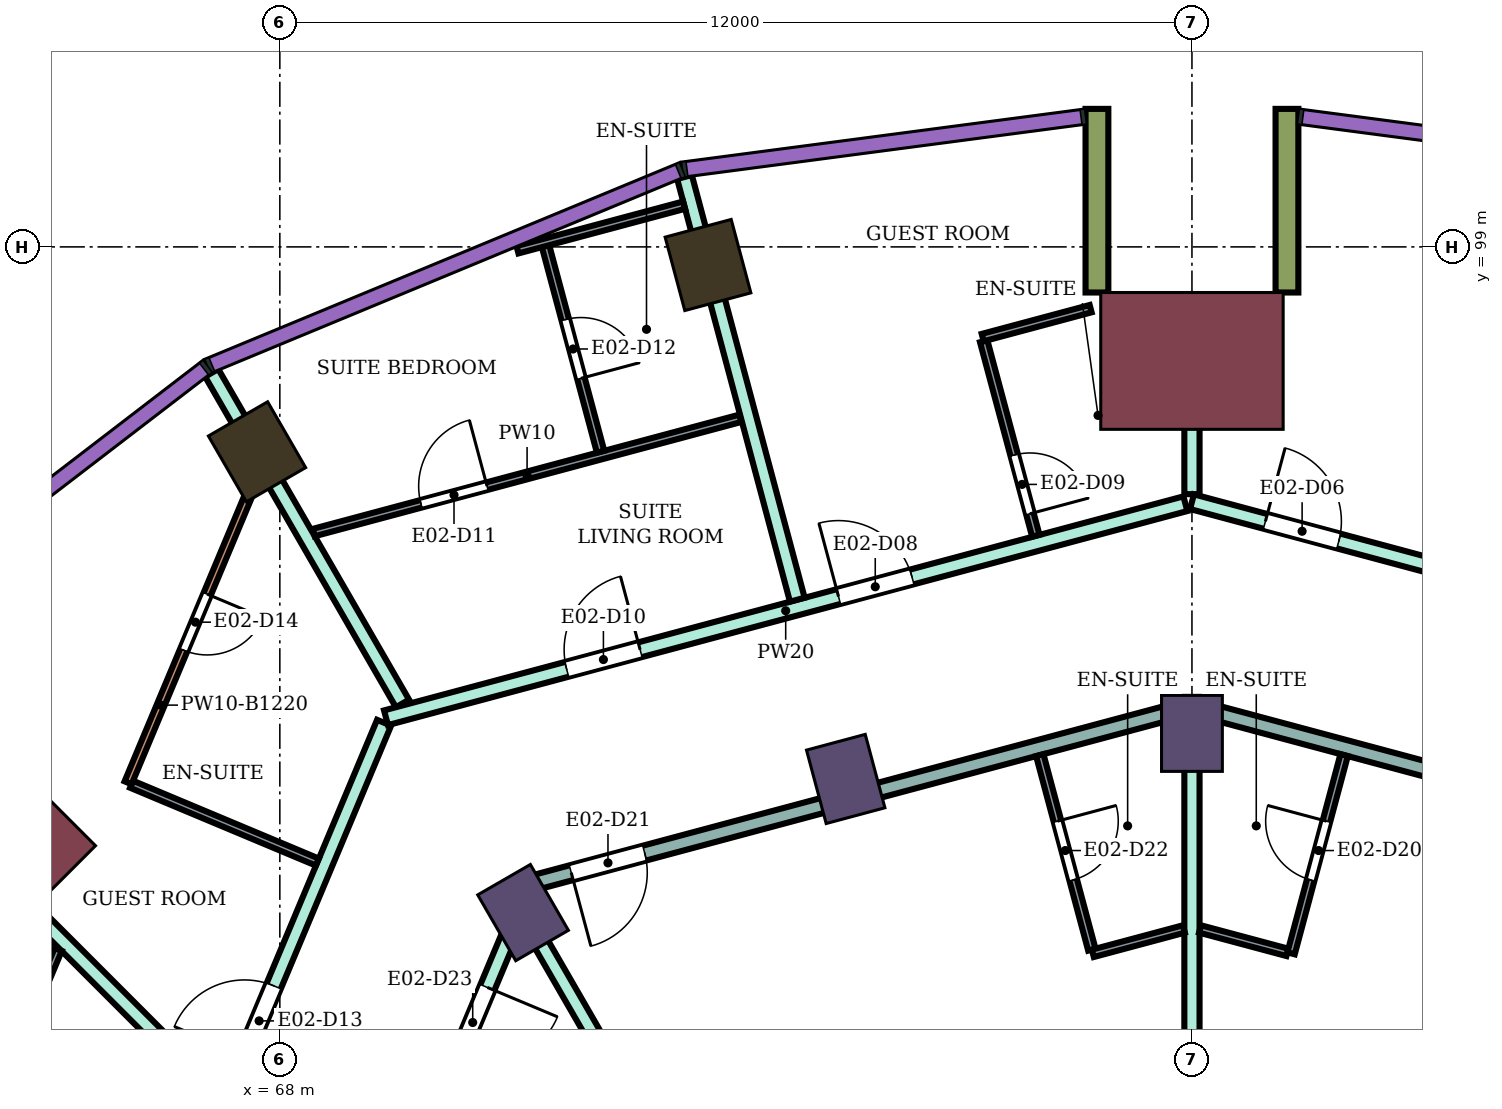
"""IFC4 building model, lengths in metres.
Left out: names, types, materials, properties, quantities, classifications, styles, units other than length and angle.
Written with IfcOpenShell. Run it as: python <this file> out.ifc"""

import sys

from ifc_helpers import new_model, si_unit, direction, frame, frame_2d, origin, origin_2d, place, context, subcontext, project, spatial, rectangle, extrude, element, fill, save


model = new_model("IFC4")
c1 = context("Model", 3, precision=1e-05, world=origin(), true_north=direction((0.0, 1.0)))
c2 = subcontext(c1, "Body", "Model", "MODEL_VIEW")
j1 = project(units=[si_unit("LENGTHUNIT", "METRE"), si_unit("PLANEANGLEUNIT", "RADIAN")], contexts=[c1])
p1 = place(None, origin())
s1 = spatial("IfcSite", under=j1, at=p1, CompositionType="ELEMENT")
p2 = place(p1, origin())
s2 = spatial("IfcBuilding", under=s1, at=p2, CompositionType="ELEMENT")
p3 = place(p2, frame((0.0, 0.0, 130.2)))
s3 = spatial("IfcBuildingStorey", under=s2, at=p3, CompositionType="ELEMENT", Elevation=130.2)
for number, where, z_axis, x_axis in (
    (1, (73.633, 98.762, 0.0), (0.0, 0.0, 1.0), (-0.259, 0.966, 0.0)),
    (2, (67.7, 96.304, 0.0), (0.0, 0.0, 1.0), (-0.5, 0.866, 0.0)),
):
    element("IfcColumn", number, at=place(p3, frame(where, z_axis=z_axis, x_axis=x_axis)), inside=s3, PredefinedType="COLUMN", context=c2, shape_type="SweptSolid", body=[
        extrude(rectangle(XDim=1.0, YDim=0.9, at=origin_2d()), origin(), (0.0, 0.0, 1.0), 3.9),
    ])
for number, where, z_axis, x_axis in (
    (3, (80.0, 92.6, 0.0), (0.0, 0.0, 1.0), (0.0, 1.0, 0.0)),
    (4, (75.445, 92.0, 0.0), (0.0, 0.0, 1.0), (-0.259, 0.966, 0.0)),
    (5, (71.2, 90.242, 0.0), (0.0, 0.0, 1.0), (-0.5, 0.866, 0.0)),
):
    element("IfcColumn", number, at=place(p3, frame(where, z_axis=z_axis, x_axis=x_axis)), inside=s3, PredefinedType="COLUMN", context=c2, shape_type="SweptSolid", body=[
        extrude(rectangle(XDim=1.0, YDim=0.8, at=origin_2d()), origin(), (0.0, 0.0, 1.0), 3.9),
    ])
for number, where, z_axis, x_axis in (
    (6, (80.0, 97.5, 0.0), (0.0, 0.0, 1.0), (0.0, 1.0, 0.0)),
    (7, (64.09, 90.91, 0.0), (0.0, 0.0, 1.0), (-0.707, 0.707, 0.0)),
):
    element("IfcColumn", number, at=place(p3, frame(where, z_axis=z_axis, x_axis=x_axis)), inside=s3, PredefinedType="COLUMN", context=c2, shape_type="SweptSolid", body=[
        extrude(rectangle(XDim=1.8, YDim=2.4, at=origin_2d()), origin(), (0.0, 0.0, 1.0), 3.9),
    ])
for number, where, z_axis, x_axis in (
    (8, (81.25, 98.4, 0.0), (0.0, 0.0, 1.0), (0.0, 1.0, 0.0)),
    (9, (78.75, 98.4, 0.0), (0.0, 0.0, 1.0), (0.0, 1.0, 0.0)),
):
    element("IfcWall", number, at=place(p3, frame(where, z_axis=z_axis, x_axis=x_axis)), inside=s3, PredefinedType="NOTDEFINED", context=c2, shape_type="SweptSolid", body=[
        extrude(rectangle(XDim=2.416, YDim=0.3, at=frame_2d((1.208, 0.0))), origin(), (0.0, 0.0, 1.0), 3.9),
    ])
p4 = place(p3, frame((63.6, 91.409, 0.0), z_axis=(0.0, 0.0, 1.0), x_axis=(0.706937509868, -0.707276011993, 0.0)))
e10 = element("IfcWall", 10, at=p4, inside=s3, PredefinedType="PARTITIONING", context=c2, shape_type="SweptSolid", body=[
    extrude(rectangle(XDim=5.049, YDim=0.2, at=frame_2d((2.524, 0.0))), origin(), (0.0, 0.0, 1.0), 3.45),
])
p5 = place(p3, frame((66.085, 84.9, 0.0), z_axis=(0.0, 0.0, 1.0), x_axis=(0.386617151403, 0.922240303956, 0.0)))
e11 = element("IfcWall", 11, at=p5, inside=s3, PredefinedType="PARTITIONING", context=c2, shape_type="SweptSolid", body=[
    extrude(rectangle(XDim=8.5, YDim=0.2, at=frame_2d((4.25, 0.0))), origin(), (0.0, 0.0, 1.0), 3.45),
])
p6 = place(p5, frame((3.748, 0.0, 0.0)))
e12 = element("IfcOpeningElement", 12, at=p6, cuts=e11, PredefinedType="OPENING", context=c2, shape_type="SweptSolid", body=[
    extrude(rectangle(XDim=1.0, YDim=2.1, at=frame_2d((0.5, 1.05))), frame((0.0, 0.11, 0.0), z_axis=(0.0, -1.0, 0.0), x_axis=(1.0, 0.0, 0.0)), (0.0, 0.0, 1.0), 0.22),
])
p7 = place(p3, frame((67.104, 97.343, 0.0), z_axis=(0.0, 0.0, 1.0), x_axis=(0.499893606134, -0.866086821598, 0.0)))
e13 = element("IfcWall", 13, at=p7, inside=s3, PredefinedType="PARTITIONING", context=c2, shape_type="SweptSolid", body=[
    extrude(rectangle(XDim=5.021, YDim=0.2, at=frame_2d((2.511, 0.0))), origin(), (0.0, 0.0, 1.0), 3.45),
])
p8 = place(p3, frame((68.277, 83.4, 0.0), z_axis=(0.0, 0.0, 1.0), x_axis=(0.386454861164, 0.922308321703, 0.0)))
e14 = element("IfcWall", 14, at=p8, inside=s3, PredefinedType="PARTITIONING", context=c2, shape_type="SweptSolid", body=[
    extrude(rectangle(XDim=7.762, YDim=0.2, at=frame_2d((3.881, 0.0))), origin(), (0.0, 0.0, 1.0), 3.45),
])
p9 = place(p8, frame((5.351, 0.0, 0.0)))
e15 = element("IfcOpeningElement", 15, at=p9, cuts=e14, PredefinedType="OPENING", context=c2, shape_type="SweptSolid", body=[
    extrude(rectangle(XDim=1.0, YDim=2.1, at=frame_2d((0.5, 1.05))), frame((0.0, 0.11, 0.0), z_axis=(0.0, -1.0, 0.0), x_axis=(1.0, 0.0, 0.0)), (0.0, 0.0, 1.0), 0.22),
])
p10 = place(p3, frame((69.397, 92.805, 0.0), z_axis=(0.0, 0.0, 1.0), x_axis=(0.965971666602, 0.258647906087, 0.0)))
e16 = element("IfcWall", 16, at=p10, inside=s3, PredefinedType="PARTITIONING", context=c2, shape_type="SweptSolid", body=[
    extrude(rectangle(XDim=10.887, YDim=0.2, at=frame_2d((5.443, 0.0))), origin(), (0.0, 0.0, 1.0), 3.45),
])
p11 = place(p10, frame((6.163, 0.0, 0.0)))
e17 = element("IfcOpeningElement", 17, at=p11, cuts=e16, PredefinedType="OPENING", context=c2, shape_type="SweptSolid", body=[
    extrude(rectangle(XDim=1.0, YDim=2.1, at=frame_2d((0.5, 1.05))), frame((0.0, 0.11, 0.0), z_axis=(0.0, -1.0, 0.0), x_axis=(1.0, 0.0, 0.0)), (0.0, 0.0, 1.0), 0.22),
])
p12 = place(p10, frame((2.461, 0.0, 0.0)))
e18 = element("IfcOpeningElement", 18, at=p12, cuts=e16, PredefinedType="OPENING", context=c2, shape_type="SweptSolid", body=[
    extrude(rectangle(XDim=1.0, YDim=2.1, at=frame_2d((0.5, 1.05))), frame((0.0, 0.11, 0.0), z_axis=(0.0, -1.0, 0.0), x_axis=(1.0, 0.0, 0.0)), (0.0, 0.0, 1.0), 0.22),
])
p13 = place(p3, frame((71.263, 90.135, 0.0), z_axis=(0.0, 0.0, 1.0), x_axis=(0.499869438034, -0.86610077065, 0.0)))
e19 = element("IfcWall", 19, at=p13, inside=s3, PredefinedType="PARTITIONING", context=c2, shape_type="SweptSolid", body=[
    extrude(rectangle(XDim=9.777, YDim=0.2, at=frame_2d((4.889, 0.0))), origin(), (0.0, 0.0, 1.0), 3.45),
])
p14 = place(p3, frame((71.303, 90.625, 0.0), z_axis=(0.0, 0.0, 1.0), x_axis=(0.965971868307, 0.258647152776, 0.0)))
e20 = element("IfcWall", 20, at=p14, inside=s3, PredefinedType="PARTITIONING", context=c2, shape_type="SweptSolid", body=[
    extrude(rectangle(XDim=8.874, YDim=0.2, at=frame_2d((4.437, 0.0))), origin(), (0.0, 0.0, 1.0), 3.08),
])
p15 = place(p14, frame((0.55, 0.0, 0.0)))
e21 = element("IfcOpeningElement", 21, at=p15, cuts=e20, PredefinedType="OPENING", context=c2, shape_type="SweptSolid", body=[
    extrude(rectangle(XDim=1.0, YDim=2.1, at=frame_2d((0.5, 1.05))), frame((0.0, 0.11, 0.0), z_axis=(0.0, -1.0, 0.0), x_axis=(1.0, 0.0, 0.0)), (0.0, 0.0, 1.0), 0.22),
])
p16 = place(p3, frame((73.324, 99.919, 0.0), z_axis=(0.0, 0.0, 1.0), x_axis=(0.257855371794, -0.966183526685, 0.0)))
e22 = element("IfcWall", 22, at=p16, inside=s3, PredefinedType="PARTITIONING", context=c2, shape_type="SweptSolid", body=[
    extrude(rectangle(XDim=5.756, YDim=0.2, at=frame_2d((2.878, 0.0))), origin(), (0.0, 0.0, 1.0), 3.45),
])
p17 = place(p3, frame((80.0, 82.699, 0.0), z_axis=(0.0, 0.0, 1.0), x_axis=(0.0, 1.0, 0.0)))
e23 = element("IfcWall", 23, at=p17, inside=s3, PredefinedType="PARTITIONING", context=c2, shape_type="SweptSolid", body=[
    extrude(rectangle(XDim=10.125, YDim=0.2, at=frame_2d((5.062, 0.0))), origin(), (0.0, 0.0, 1.0), 3.45),
])
p18 = place(p3, frame((80.0, 92.954, 0.0), z_axis=(0.0, 0.0, 1.0), x_axis=(0.96592536278, -0.258820774936, 0.0)))
e24 = element("IfcWall", 24, at=p18, inside=s3, PredefinedType="PARTITIONING", context=c2, shape_type="SweptSolid", body=[
    extrude(rectangle(XDim=8.934, YDim=0.2, at=frame_2d((4.467, 0.0))), origin(), (0.0, 0.0, 1.0), 3.08),
])
p19 = place(p18, frame((7.454, 0.0, 0.0)))
e25 = element("IfcOpeningElement", 25, at=p19, cuts=e24, PredefinedType="OPENING", context=c2, shape_type="SweptSolid", body=[
    extrude(rectangle(XDim=1.0, YDim=2.1, at=frame_2d((0.5, 1.05))), frame((0.0, 0.11, 0.0), z_axis=(0.0, -1.0, 0.0), x_axis=(1.0, 0.0, 0.0)), (0.0, 0.0, 1.0), 0.22),
])
p20 = place(p3, frame((80.0, 95.747, 0.0), z_axis=(0.0, 0.0, 1.0), x_axis=(0.0, 1.0, 0.0)))
e26 = element("IfcWall", 26, at=p20, inside=s3, PredefinedType="PARTITIONING", context=c2, shape_type="SweptSolid", body=[
    extrude(rectangle(XDim=2.452, YDim=0.2, at=frame_2d((1.226, 0.0))), origin(), (0.0, 0.0, 1.0), 3.45),
])
p21 = place(p3, frame((80.0, 95.648, 0.0), z_axis=(0.0, 0.0, 1.0), x_axis=(0.965852259202, -0.259093445292, 0.0)))
e27 = element("IfcWall", 27, at=p21, inside=s3, PredefinedType="PARTITIONING", context=c2, shape_type="SweptSolid", body=[
    extrude(rectangle(XDim=10.597, YDim=0.2, at=frame_2d((5.298, 0.0))), origin(), (0.0, 0.0, 1.0), 3.45),
])
p22 = place(p21, frame((1.0, 0.0, 0.0)))
e28 = element("IfcOpeningElement", 28, at=p22, cuts=e27, PredefinedType="OPENING", context=c2, shape_type="SweptSolid", body=[
    extrude(rectangle(XDim=1.0, YDim=2.1, at=frame_2d((0.5, 1.05))), frame((0.0, 0.11, 0.0), z_axis=(0.0, -1.0, 0.0), x_axis=(1.0, 0.0, 0.0)), (0.0, 0.0, 1.0), 0.22),
])
p23 = place(p3, frame((63.896, 86.92, 0.0), z_axis=(0.0, 0.0, 1.0), x_axis=(0.386637413037, 0.922231809709, 0.0)))
e29 = element("IfcWall", 29, at=p23, inside=s3, PredefinedType="PARTITIONING", context=c2, shape_type="SweptSolid", body=[
    extrude(rectangle(XDim=3.076, YDim=0.1, at=frame_2d((1.538, 0.0))), origin(), (0.0, 0.0, 1.0), 3.45),
])
p24 = place(p23, frame((1.173, 0.0, 0.0)))
e30 = element("IfcOpeningElement", 30, at=p24, cuts=e29, PredefinedType="OPENING", context=c2, shape_type="SweptSolid", body=[
    extrude(rectangle(XDim=0.8, YDim=2.1, at=frame_2d((0.4, 1.05))), frame((0.0, 0.06, 0.0), z_axis=(0.0, -1.0, 0.0), x_axis=(1.0, 0.0, 0.0)), (0.0, 0.0, 1.0), 0.12),
])
p25 = place(p3, frame((66.049, 91.931, 0.0), z_axis=(0.0, 0.0, 1.0), x_axis=(0.922344808264, -0.38636777126, 0.0)))
e31 = element("IfcWall", 31, at=p25, inside=s3, PredefinedType="PARTITIONING", context=c2, shape_type="SweptSolid", body=[
    extrude(rectangle(XDim=2.65, YDim=0.1, at=frame_2d((1.325, 0.0))), origin(), (0.0, 0.0, 1.0), 3.45),
])
p26 = place(p3, frame((66.004, 91.95, 0.0), z_axis=(0.0, 0.0, 1.0), x_axis=(0.386601257709, 0.922246966673, 0.0)))
e32 = element("IfcWall", 32, at=p26, inside=s3, PredefinedType="PARTITIONING", context=c2, shape_type="SweptSolid", body=[
    extrude(rectangle(XDim=4.433, YDim=0.1, at=frame_2d((2.216, 0.0))), origin(), (0.0, 0.0, 1.0), 2.68),
])
p27 = place(p26, frame((1.891, 0.0, 0.0)))
e33 = element("IfcOpeningElement", 33, at=p27, cuts=e32, PredefinedType="OPENING", context=c2, shape_type="SweptSolid", body=[
    extrude(rectangle(XDim=0.8, YDim=2.1, at=frame_2d((0.4, 1.05))), frame((0.0, 0.06, 0.0), z_axis=(0.0, -1.0, 0.0), x_axis=(1.0, 0.0, 0.0)), (0.0, 0.0, 1.0), 0.12),
])
p28 = place(p3, frame((68.447, 95.242, 0.0), z_axis=(0.0, 0.0, 1.0), x_axis=(0.965958178477, 0.258698274894, 0.0)))
e34 = element("IfcWall", 34, at=p28, inside=s3, PredefinedType="PARTITIONING", context=c2, shape_type="SweptSolid", body=[
    extrude(rectangle(XDim=5.81, YDim=0.1, at=frame_2d((2.905, 0.0))), origin(), (0.0, 0.0, 1.0), 3.45),
])
p29 = place(p28, frame((1.46, 0.0, 0.0)))
e35 = element("IfcOpeningElement", 35, at=p29, cuts=e34, PredefinedType="OPENING", context=c2, shape_type="SweptSolid", body=[
    extrude(rectangle(XDim=0.9, YDim=2.1, at=frame_2d((0.45, 1.05))), frame((0.0, 0.06, 0.0), z_axis=(0.0, -1.0, 0.0), x_axis=(1.0, 0.0, 0.0)), (0.0, 0.0, 1.0), 0.12),
])
p30 = place(p3, frame((71.459, 99.147, 0.0), z_axis=(0.0, 0.0, 1.0), x_axis=(0.258550824249, -0.965997655939, 0.0)))
e36 = element("IfcWall", 36, at=p30, inside=s3, PredefinedType="PARTITIONING", context=c2, shape_type="SweptSolid", body=[
    extrude(rectangle(XDim=2.942, YDim=0.1, at=frame_2d((1.471, 0.0))), origin(), (0.0, 0.0, 1.0), 3.45),
])
p31 = place(p30, frame((1.143, 0.0, 0.0)))
e37 = element("IfcOpeningElement", 37, at=p31, cuts=e36, PredefinedType="OPENING", context=c2, shape_type="SweptSolid", body=[
    extrude(rectangle(XDim=0.8, YDim=2.1, at=frame_2d((0.4, 1.05))), frame((0.0, 0.06, 0.0), z_axis=(0.0, -1.0, 0.0), x_axis=(1.0, 0.0, 0.0)), (0.0, 0.0, 1.0), 0.12),
])
p32 = place(p3, frame((71.126, 98.963, 0.0), z_axis=(0.0, 0.0, 1.0), x_axis=(0.966023883118, 0.258452814352, 0.0)))
e38 = element("IfcWall", 38, at=p32, inside=s3, PredefinedType="PARTITIONING", context=c2, shape_type="SweptSolid", body=[
    extrude(rectangle(XDim=2.269, YDim=0.1, at=frame_2d((1.135, 0.0))), origin(), (0.0, 0.0, 1.0), 3.45),
])
p33 = place(p3, frame((77.26, 97.759, 0.0), z_axis=(0.0, 0.0, 1.0), x_axis=(0.258935674139, -0.965894568086, 0.0)))
e39 = element("IfcWall", 39, at=p33, inside=s3, PredefinedType="PARTITIONING", context=c2, shape_type="SweptSolid", body=[
    extrude(rectangle(XDim=2.649, YDim=0.1, at=frame_2d((1.325, 0.0))), origin(), (0.0, 0.0, 1.0), 3.45),
])
p34 = place(p33, frame((1.55, 0.0, 0.0)))
e40 = element("IfcOpeningElement", 40, at=p34, cuts=e39, PredefinedType="OPENING", context=c2, shape_type="SweptSolid", body=[
    extrude(rectangle(XDim=0.8, YDim=2.1, at=frame_2d((0.4, 1.05))), frame((0.0, 0.06, 0.0), z_axis=(0.0, -1.0, 0.0), x_axis=(1.0, 0.0, 0.0)), (0.0, 0.0, 1.0), 0.12),
])
p35 = place(p3, frame((77.247, 97.807, 0.0), z_axis=(0.0, 0.0, 1.0), x_axis=(0.965900598974, 0.258913176376, 0.0)))
e41 = element("IfcWall", 41, at=p35, inside=s3, PredefinedType="PARTITIONING", context=c2, shape_type="SweptSolid", body=[
    extrude(rectangle(XDim=1.47, YDim=0.1, at=frame_2d((0.735, 0.0))), origin(), (0.0, 0.0, 1.0), 3.45),
])
p36 = place(p3, frame((77.998, 92.314, 0.0), z_axis=(0.0, 0.0, 1.0), x_axis=(0.258608674509, -0.965982170368, 0.0)))
e42 = element("IfcWall", 42, at=p36, inside=s3, PredefinedType="PARTITIONING", context=c2, shape_type="SweptSolid", body=[
    extrude(rectangle(XDim=2.65, YDim=0.1, at=frame_2d((1.325, 0.0))), origin(), (0.0, 0.0, 1.0), 3.45),
])
p37 = place(p36, frame((0.9, 0.0, 0.0)))
e43 = element("IfcOpeningElement", 43, at=p37, cuts=e42, PredefinedType="OPENING", context=c2, shape_type="SweptSolid", body=[
    extrude(rectangle(XDim=0.8, YDim=2.1, at=frame_2d((0.4, 1.05))), frame((0.0, 0.06, 0.0), z_axis=(0.0, -1.0, 0.0), x_axis=(1.0, 0.0, 0.0)), (0.0, 0.0, 1.0), 0.12),
])
p38 = place(p3, frame((78.696, 89.706, 0.0), z_axis=(0.0, 0.0, 1.0), x_axis=(0.966002513606, 0.258532674351, 0.0)))
e44 = element("IfcWall", 44, at=p38, inside=s3, PredefinedType="PARTITIONING", context=c2, shape_type="SweptSolid", body=[
    extrude(rectangle(XDim=1.24, YDim=0.1, at=frame_2d((0.62, 0.0))), origin(), (0.0, 0.0, 1.0), 3.45),
])
p39 = place(p3, frame((80.106, 90.027, 0.0), z_axis=(0.0, 0.0, 1.0), x_axis=(0.966002973184, -0.258530957139, 0.0)))
e45 = element("IfcWall", 45, at=p39, inside=s3, PredefinedType="PARTITIONING", context=c2, shape_type="SweptSolid", body=[
    extrude(rectangle(XDim=1.19, YDim=0.1, at=frame_2d((0.595, 0.0))), origin(), (0.0, 0.0, 1.0), 3.45),
])
p40 = place(p3, frame((81.304, 89.706, 0.0), z_axis=(0.0, 0.0, 1.0), x_axis=(0.258608022684, 0.965982344872, 0.0)))
e46 = element("IfcWall", 46, at=p40, inside=s3, PredefinedType="PARTITIONING", context=c2, shape_type="SweptSolid", body=[
    extrude(rectangle(XDim=2.7, YDim=0.1, at=frame_2d((1.35, 0.0))), origin(), (0.0, 0.0, 1.0), 3.45),
])
p41 = place(p40, frame((1.0, 0.0, 0.0)))
e47 = element("IfcOpeningElement", 47, at=p41, cuts=e46, PredefinedType="OPENING", context=c2, shape_type="SweptSolid", body=[
    extrude(rectangle(XDim=0.8, YDim=2.1, at=frame_2d((0.4, 1.05))), frame((0.0, 0.06, 0.0), z_axis=(0.0, -1.0, 0.0), x_axis=(1.0, 0.0, 0.0)), (0.0, 0.0, 1.0), 0.12),
])
p42 = place(p22, origin())
e48 = element("IfcDoor", 48, at=p42, inside=s3, OperationType="SINGLE_SWING_LEFT", PredefinedType="DOOR", context=c2, shape_type="SweptSolid", body=[
    extrude(rectangle(XDim=1.0, YDim=2.1, at=frame_2d((0.5, 1.05))), frame((0.0, 0.025, 0.0), z_axis=(0.0, -1.0, 0.0), x_axis=(1.0, 0.0, 0.0)), (0.0, 0.0, 1.0), 0.05),
])
fill(e28, e48)
p43 = place(p11, origin())
e49 = element("IfcDoor", 49, at=p43, inside=s3, OperationType="SINGLE_SWING_LEFT", PredefinedType="DOOR", context=c2, shape_type="SweptSolid", body=[
    extrude(rectangle(XDim=1.0, YDim=2.1, at=frame_2d((0.5, 1.05))), frame((0.0, 0.025, 0.0), z_axis=(0.0, -1.0, 0.0), x_axis=(1.0, 0.0, 0.0)), (0.0, 0.0, 1.0), 0.05),
])
fill(e17, e49)
p44 = place(p34, origin())
e50 = element("IfcDoor", 50, at=p44, inside=s3, OperationType="SINGLE_SWING_RIGHT", PredefinedType="DOOR", context=c2, shape_type="SweptSolid", body=[
    extrude(rectangle(XDim=0.8, YDim=2.1, at=frame_2d((0.4, 1.05))), frame((0.0, 0.025, 0.0), z_axis=(0.0, -1.0, 0.0), x_axis=(1.0, 0.0, 0.0)), (0.0, 0.0, 1.0), 0.05),
])
fill(e40, e50)
p45 = place(p12, origin())
e51 = element("IfcDoor", 51, at=p45, inside=s3, OperationType="SINGLE_SWING_RIGHT", PredefinedType="DOOR", context=c2, shape_type="SweptSolid", body=[
    extrude(rectangle(XDim=1.0, YDim=2.1, at=frame_2d((0.5, 1.05))), frame((0.0, 0.025, 0.0), z_axis=(0.0, -1.0, 0.0), x_axis=(1.0, 0.0, 0.0)), (0.0, 0.0, 1.0), 0.05),
])
fill(e18, e51)
p46 = place(p29, origin())
e52 = element("IfcDoor", 52, at=p46, inside=s3, OperationType="SINGLE_SWING_RIGHT", PredefinedType="DOOR", context=c2, shape_type="SweptSolid", body=[
    extrude(rectangle(XDim=0.9, YDim=2.1, at=frame_2d((0.45, 1.05))), frame((0.0, 0.025, 0.0), z_axis=(0.0, -1.0, 0.0), x_axis=(1.0, 0.0, 0.0)), (0.0, 0.0, 1.0), 0.05),
])
fill(e35, e52)
p47 = place(p31, origin())
e53 = element("IfcDoor", 53, at=p47, inside=s3, OperationType="SINGLE_SWING_RIGHT", PredefinedType="DOOR", context=c2, shape_type="SweptSolid", body=[
    extrude(rectangle(XDim=0.8, YDim=2.1, at=frame_2d((0.4, 1.05))), frame((0.0, 0.025, 0.0), z_axis=(0.0, -1.0, 0.0), x_axis=(1.0, 0.0, 0.0)), (0.0, 0.0, 1.0), 0.05),
])
fill(e37, e53)
p48 = place(p6, origin())
e54 = element("IfcDoor", 54, at=p48, inside=s3, OperationType="SINGLE_SWING_LEFT", PredefinedType="DOOR", context=c2, shape_type="SweptSolid", body=[
    extrude(rectangle(XDim=1.0, YDim=2.1, at=frame_2d((0.5, 1.05))), frame((0.0, 0.025, 0.0), z_axis=(0.0, -1.0, 0.0), x_axis=(1.0, 0.0, 0.0)), (0.0, 0.0, 1.0), 0.05),
])
fill(e12, e54)
p49 = place(p27, frame((0.8, 0.0, 0.0), z_axis=(0.0, 0.0, 1.0), x_axis=(-1.0, 0.0, 0.0)))
e55 = element("IfcDoor", 55, at=p49, inside=s3, OperationType="SINGLE_SWING_LEFT", PredefinedType="DOOR", context=c2, shape_type="SweptSolid", body=[
    extrude(rectangle(XDim=0.8, YDim=2.1, at=frame_2d((0.4, 1.05))), frame((0.0, 0.025, 0.0), z_axis=(0.0, -1.0, 0.0), x_axis=(1.0, 0.0, 0.0)), (0.0, 0.0, 1.0), 0.05),
])
fill(e33, e55)
p50 = place(p41, origin())
e56 = element("IfcDoor", 56, at=p50, inside=s3, OperationType="SINGLE_SWING_RIGHT", PredefinedType="DOOR", context=c2, shape_type="SweptSolid", body=[
    extrude(rectangle(XDim=0.8, YDim=2.1, at=frame_2d((0.4, 1.05))), frame((0.0, 0.025, 0.0), z_axis=(0.0, -1.0, 0.0), x_axis=(1.0, 0.0, 0.0)), (0.0, 0.0, 1.0), 0.05),
])
fill(e47, e56)
p51 = place(p15, frame((1.0, 0.0, 0.0), z_axis=(0.0, 0.0, 1.0), x_axis=(-1.0, 0.0, 0.0)))
e57 = element("IfcDoor", 57, at=p51, inside=s3, OperationType="SINGLE_SWING_RIGHT", PredefinedType="DOOR", context=c2, shape_type="SweptSolid", body=[
    extrude(rectangle(XDim=1.0, YDim=2.1, at=frame_2d((0.5, 1.05))), frame((0.0, 0.025, 0.0), z_axis=(0.0, -1.0, 0.0), x_axis=(1.0, 0.0, 0.0)), (0.0, 0.0, 1.0), 0.05),
])
fill(e21, e57)
p52 = place(p37, origin())
e58 = element("IfcDoor", 58, at=p52, inside=s3, OperationType="SINGLE_SWING_LEFT", PredefinedType="DOOR", context=c2, shape_type="SweptSolid", body=[
    extrude(rectangle(XDim=0.8, YDim=2.1, at=frame_2d((0.4, 1.05))), frame((0.0, 0.025, 0.0), z_axis=(0.0, -1.0, 0.0), x_axis=(1.0, 0.0, 0.0)), (0.0, 0.0, 1.0), 0.05),
])
fill(e43, e58)
p53 = place(p9, frame((1.0, 0.0, 0.0), z_axis=(0.0, 0.0, 1.0), x_axis=(-1.0, 0.0, 0.0)))
e59 = element("IfcDoor", 59, at=p53, inside=s3, OperationType="SINGLE_SWING_LEFT", PredefinedType="DOOR", context=c2, shape_type="SweptSolid", body=[
    extrude(rectangle(XDim=1.0, YDim=2.1, at=frame_2d((0.5, 1.05))), frame((0.0, 0.025, 0.0), z_axis=(0.0, -1.0, 0.0), x_axis=(1.0, 0.0, 0.0)), (0.0, 0.0, 1.0), 0.05),
])
fill(e15, e59)
save(model, sys.argv[1])
